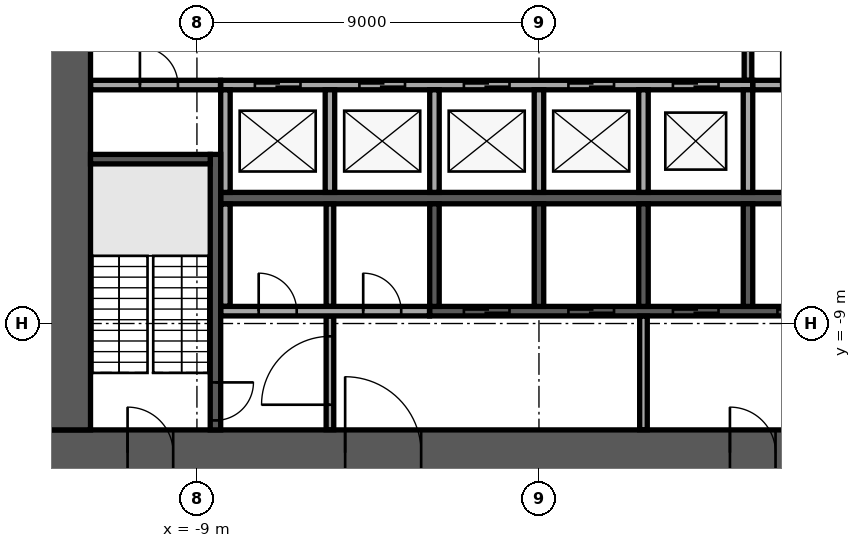
"""IFC4 building model, lengths in metres.
Left out: names, types, materials, properties, quantities, classifications, styles, units other than length and angle.
Written with IfcOpenShell. Run it as: python <this file> out.ifc"""

import sys

from ifc_helpers import new_model, si_unit, direction, frame, frame_2d, origin, place, context, subcontext, project, spatial, rectangle, extrude, element, fill, save


model = new_model("IFC4")
c1 = context("Model", 3, precision=1e-05, world=origin(), true_north=direction((0.0, 1.0)))
c2 = subcontext(c1, "Body", "Model", "MODEL_VIEW")
j1 = project(units=[si_unit("LENGTHUNIT", "METRE"), si_unit("PLANEANGLEUNIT", "RADIAN")], contexts=[c1])
p1 = place(None, origin())
s1 = spatial("IfcSite", under=j1, at=p1, CompositionType="ELEMENT")
p2 = place(p1, origin())
s2 = spatial("IfcBuilding", under=s1, at=p2, CompositionType="ELEMENT")
p3 = place(p2, origin())
s3 = spatial("IfcBuildingStorey", under=s2, at=p3, CompositionType="ELEMENT", Elevation=0.0)
p4 = place(p3, frame((-13.0, -12.4, 0.0), z_axis=(0.0, 0.0, 1.0), x_axis=(1.0, 0.0, 0.0)))
e1 = element("IfcWall", 1, at=p4, inside=s3, PredefinedType="SHEAR", context=c2, shape_type="SweptSolid", body=[
    extrude(rectangle(XDim=26.0, YDim=1.2, at=frame_2d((13.0, 0.0))), origin(), (0.0, 0.0, 1.0), 4.1),
])
p5 = place(p4, frame((7.9, 0.0, 0.0)))
e2 = element("IfcOpeningElement", 2, at=p5, cuts=e1, PredefinedType="OPENING", context=c2, shape_type="SweptSolid", body=[
    extrude(rectangle(XDim=2.0, YDim=2.1, at=frame_2d((1.0, 1.05))), frame((0.0, 0.61, 0.0), z_axis=(0.0, -1.0, 0.0), x_axis=(1.0, 0.0, 0.0)), (0.0, 0.0, 1.0), 1.22),
])
p6 = place(p4, frame((18.025, 0.0, 0.0)))
e3 = element("IfcOpeningElement", 3, at=p6, cuts=e1, PredefinedType="OPENING", context=c2, shape_type="SweptSolid", body=[
    extrude(rectangle(XDim=1.2, YDim=2.1, at=frame_2d((0.6, 1.05))), frame((0.0, 0.61, 0.0), z_axis=(0.0, -1.0, 0.0), x_axis=(1.0, 0.0, 0.0)), (0.0, 0.0, 1.0), 1.22),
])
p7 = place(p4, frame((2.175, 0.0, 0.0)))
e4 = element("IfcOpeningElement", 4, at=p7, cuts=e1, PredefinedType="OPENING", context=c2, shape_type="SweptSolid", body=[
    extrude(rectangle(XDim=1.2, YDim=2.1, at=frame_2d((0.6, 1.05))), frame((0.0, 0.61, 0.0), z_axis=(0.0, -1.0, 0.0), x_axis=(1.0, 0.0, 0.0)), (0.0, 0.0, 1.0), 1.22),
])
p8 = place(p4, frame((22.625, 0.0, 0.0)))
e5 = element("IfcOpeningElement", 5, at=p8, cuts=e1, PredefinedType="OPENING", context=c2, shape_type="SweptSolid", body=[
    extrude(rectangle(XDim=1.2, YDim=2.1, at=frame_2d((0.6, 1.05))), frame((0.0, 0.61, 0.0), z_axis=(0.0, -1.0, 0.0), x_axis=(1.0, 0.0, 0.0)), (0.0, 0.0, 1.0), 1.22),
])
p9 = place(p3, frame((-12.4, -11.8, 0.0), z_axis=(0.0, 0.0, 1.0), x_axis=(0.0, 1.0, 0.0)))
e6 = element("IfcWall", 6, at=p9, inside=s3, PredefinedType="SHEAR", context=c2, shape_type="SweptSolid", body=[
    extrude(rectangle(XDim=23.6, YDim=1.2, at=frame_2d((11.8, 0.0))), origin(), (0.0, 0.0, 1.0), 4.1),
])
p10 = place(p9, frame((10.6, 0.0, 0.0)))
e7 = element("IfcOpeningElement", 7, at=p10, cuts=e6, PredefinedType="OPENING", context=c2, shape_type="SweptSolid", body=[
    extrude(rectangle(XDim=2.4, YDim=2.4, at=frame_2d((1.2, 1.2))), frame((0.0, 0.61, 0.0), z_axis=(0.0, -1.0, 0.0), x_axis=(1.0, 0.0, 0.0)), (0.0, 0.0, 1.0), 1.22),
])
p11 = place(p3, frame((-8.375, -5.7, 0.0), z_axis=(0.0, 0.0, 1.0), x_axis=(1.0, 0.0, 0.0)))
e8 = element("IfcWall", 8, at=p11, inside=s3, PredefinedType="SOLIDWALL", context=c2, shape_type="SweptSolid", body=[
    extrude(rectangle(XDim=16.75, YDim=0.3, at=frame_2d((8.375, 0.0))), origin(), (0.0, 0.0, 1.0), 4.1),
])
p12 = place(p3, frame((-8.375, -2.725, 0.0), z_axis=(0.0, 0.0, 1.0), x_axis=(1.0, 0.0, 0.0)))
e9 = element("IfcWall", 9, at=p12, inside=s3, PredefinedType="SOLIDWALL", context=c2, shape_type="SweptSolid", body=[
    extrude(rectangle(XDim=14.0, YDim=0.25, at=frame_2d((7.0, 0.0))), origin(), (0.0, 0.0, 1.0), 4.1),
])
p13 = place(p12, frame((0.9, 0.0, 0.0)))
e10 = element("IfcOpeningElement", 10, at=p13, cuts=e9, PredefinedType="OPENING", context=c2, shape_type="SweptSolid", body=[
    extrude(rectangle(XDim=1.2, YDim=2.1, at=frame_2d((0.6, 1.05))), frame((0.0, 0.135, 0.0), z_axis=(0.0, -1.0, 0.0), x_axis=(1.0, 0.0, 0.0)), (0.0, 0.0, 1.0), 0.27),
])
p14 = place(p12, frame((3.65, 0.0, 0.0)))
e11 = element("IfcOpeningElement", 11, at=p14, cuts=e9, PredefinedType="OPENING", context=c2, shape_type="SweptSolid", body=[
    extrude(rectangle(XDim=1.2, YDim=2.1, at=frame_2d((0.6, 1.05))), frame((0.0, 0.135, 0.0), z_axis=(0.0, -1.0, 0.0), x_axis=(1.0, 0.0, 0.0)), (0.0, 0.0, 1.0), 0.27),
])
p15 = place(p12, frame((6.4, 0.0, 0.0)))
e12 = element("IfcOpeningElement", 12, at=p15, cuts=e9, PredefinedType="OPENING", context=c2, shape_type="SweptSolid", body=[
    extrude(rectangle(XDim=1.2, YDim=2.1, at=frame_2d((0.6, 1.05))), frame((0.0, 0.135, 0.0), z_axis=(0.0, -1.0, 0.0), x_axis=(1.0, 0.0, 0.0)), (0.0, 0.0, 1.0), 0.27),
])
p16 = place(p12, frame((9.15, 0.0, 0.0)))
e13 = element("IfcOpeningElement", 13, at=p16, cuts=e9, PredefinedType="OPENING", context=c2, shape_type="SweptSolid", body=[
    extrude(rectangle(XDim=1.2, YDim=2.1, at=frame_2d((0.6, 1.05))), frame((0.0, 0.135, 0.0), z_axis=(0.0, -1.0, 0.0), x_axis=(1.0, 0.0, 0.0)), (0.0, 0.0, 1.0), 0.27),
])
p17 = place(p12, frame((11.9, 0.0, 0.0)))
e14 = element("IfcOpeningElement", 14, at=p17, cuts=e9, PredefinedType="OPENING", context=c2, shape_type="SweptSolid", body=[
    extrude(rectangle(XDim=1.2, YDim=2.1, at=frame_2d((0.6, 1.05))), frame((0.0, 0.135, 0.0), z_axis=(0.0, -1.0, 0.0), x_axis=(1.0, 0.0, 0.0)), (0.0, 0.0, 1.0), 0.27),
])
for number, where, z_axis, x_axis in (
    (15, (-8.25, -5.55, 0.0), (0.0, 0.0, 1.0), (0.0, 1.0, 0.0)),
    (16, (-5.5, -5.55, 0.0), (0.0, 0.0, 1.0), (0.0, 1.0, 0.0)),
    (17, (-2.75, -5.55, 0.0), (0.0, 0.0, 1.0), (0.0, 1.0, 0.0)),
    (18, (0.0, -5.55, 0.0), (0.0, 0.0, 1.0), (0.0, 1.0, 0.0)),
    (19, (2.75, -5.55, 0.0), (0.0, 0.0, 1.0), (0.0, 1.0, 0.0)),
    (20, (5.5, -5.55, 0.0), (0.0, 0.0, 1.0), (0.0, 1.0, 0.0)),
):
    element("IfcWall", number, at=place(p3, frame(where, z_axis=z_axis, x_axis=x_axis)), inside=s3, PredefinedType="SOLIDWALL", context=c2, shape_type="SweptSolid", body=[
        extrude(rectangle(XDim=2.7, YDim=0.25, at=frame_2d((1.35, 0.0))), origin(), (0.0, 0.0, 1.0), 4.1),
    ])
p18 = place(p3, frame((-2.875, -8.675, 0.0), z_axis=(0.0, 0.0, 1.0), x_axis=(1.0, 0.0, 0.0)))
e21 = element("IfcWall", 21, at=p18, inside=s3, PredefinedType="SOLIDWALL", context=c2, shape_type="SweptSolid", body=[
    extrude(rectangle(XDim=11.25, YDim=0.25, at=frame_2d((5.625, 0.0))), origin(), (0.0, 0.0, 1.0), 4.1),
])
p19 = place(p18, frame((0.9, 0.0, 0.0)))
e22 = element("IfcOpeningElement", 22, at=p19, cuts=e21, PredefinedType="OPENING", context=c2, shape_type="SweptSolid", body=[
    extrude(rectangle(XDim=1.2, YDim=2.1, at=frame_2d((0.6, 1.05))), frame((0.0, 0.135, 0.0), z_axis=(0.0, -1.0, 0.0), x_axis=(1.0, 0.0, 0.0)), (0.0, 0.0, 1.0), 0.27),
])
p20 = place(p18, frame((3.65, 0.0, 0.0)))
e23 = element("IfcOpeningElement", 23, at=p20, cuts=e21, PredefinedType="OPENING", context=c2, shape_type="SweptSolid", body=[
    extrude(rectangle(XDim=1.2, YDim=2.1, at=frame_2d((0.6, 1.05))), frame((0.0, 0.135, 0.0), z_axis=(0.0, -1.0, 0.0), x_axis=(1.0, 0.0, 0.0)), (0.0, 0.0, 1.0), 0.27),
])
p21 = place(p18, frame((6.4, 0.0, 0.0)))
e24 = element("IfcOpeningElement", 24, at=p21, cuts=e21, PredefinedType="OPENING", context=c2, shape_type="SweptSolid", body=[
    extrude(rectangle(XDim=1.2, YDim=2.1, at=frame_2d((0.6, 1.05))), frame((0.0, 0.135, 0.0), z_axis=(0.0, -1.0, 0.0), x_axis=(1.0, 0.0, 0.0)), (0.0, 0.0, 1.0), 0.27),
])
p22 = place(p18, frame((9.15, 0.0, 0.0)))
e25 = element("IfcOpeningElement", 25, at=p22, cuts=e21, PredefinedType="OPENING", context=c2, shape_type="SweptSolid", body=[
    extrude(rectangle(XDim=1.2, YDim=2.1, at=frame_2d((0.6, 1.05))), frame((0.0, 0.135, 0.0), z_axis=(0.0, -1.0, 0.0), x_axis=(1.0, 0.0, 0.0)), (0.0, 0.0, 1.0), 0.27),
])
for number, where, z_axis, x_axis in (
    (26, (-2.75, -8.55, 0.0), (0.0, 0.0, 1.0), (0.0, 1.0, 0.0)),
    (27, (0.0, -8.55, 0.0), (0.0, 0.0, 1.0), (0.0, 1.0, 0.0)),
    (28, (2.75, -8.55, 0.0), (0.0, 0.0, 1.0), (0.0, 1.0, 0.0)),
    (29, (5.5, -8.55, 0.0), (0.0, 0.0, 1.0), (0.0, 1.0, 0.0)),
):
    element("IfcWall", number, at=place(p3, frame(where, z_axis=z_axis, x_axis=x_axis)), inside=s3, PredefinedType="SOLIDWALL", context=c2, shape_type="SweptSolid", body=[
        extrude(rectangle(XDim=2.7, YDim=0.25, at=frame_2d((1.35, 0.0))), origin(), (0.0, 0.0, 1.0), 4.1),
    ])
p23 = place(p3, frame((-8.512, -4.55, 0.0), z_axis=(0.0, 0.0, 1.0), x_axis=(0.0, -1.0, 0.0)))
e30 = element("IfcWall", 30, at=p23, inside=s3, PredefinedType="SOLIDWALL", context=c2, shape_type="SweptSolid", body=[
    extrude(rectangle(XDim=7.25, YDim=0.275, at=frame_2d((3.625, 0.0))), origin(), (0.0, 0.0, 1.0), 4.1),
])
p24 = place(p23, frame((6.0, 0.0, 0.0)))
e31 = element("IfcOpeningElement", 31, at=p24, cuts=e30, PredefinedType="OPENING", context=c2, shape_type="SweptSolid", body=[
    extrude(rectangle(XDim=1.0, YDim=2.1, at=frame_2d((0.5, 1.05))), frame((0.0, 0.147, 0.0), z_axis=(0.0, -1.0, 0.0), x_axis=(1.0, 0.0, 0.0)), (0.0, 0.0, 1.0), 0.295),
])
p25 = place(p3, frame((-8.65, -4.675, 0.0), z_axis=(0.0, 0.0, 1.0), x_axis=(-1.0, 0.0, 0.0)))
e32 = element("IfcWall", 32, at=p25, inside=s3, PredefinedType="SOLIDWALL", context=c2, shape_type="SweptSolid", body=[
    extrude(rectangle(XDim=3.15, YDim=0.25, at=frame_2d((1.575, 0.0))), origin(), (0.0, 0.0, 1.0), 4.1),
])
p26 = place(p3, frame((-5.5, -11.795, 0.0), z_axis=(0.0, 0.0, 1.0), x_axis=(0.0, 1.0, 0.0)))
e33 = element("IfcWall", 33, at=p26, inside=s3, PredefinedType="PARTITIONING", context=c2, shape_type="SweptSolid", body=[
    extrude(rectangle(XDim=2.99, YDim=0.2, at=frame_2d((1.495, 0.0))), origin(), (0.0, 0.0, 1.0), 4.1),
])
p27 = place(p26, frame((0.657, 0.0, 0.0)))
e34 = element("IfcOpeningElement", 34, at=p27, cuts=e33, PredefinedType="OPENING", context=c2, shape_type="SweptSolid", body=[
    extrude(rectangle(XDim=1.8, YDim=2.1, at=frame_2d((0.9, 1.05))), frame((0.0, 0.11, 0.0), z_axis=(0.0, -1.0, 0.0), x_axis=(1.0, 0.0, 0.0)), (0.0, 0.0, 1.0), 0.22),
])
p28 = place(p3, frame((2.75, -11.795, 0.0), z_axis=(0.0, 0.0, 1.0), x_axis=(0.0, 1.0, 0.0)))
e35 = element("IfcWall", 35, at=p28, inside=s3, PredefinedType="PARTITIONING", context=c2, shape_type="SweptSolid", body=[
    extrude(rectangle(XDim=2.99, YDim=0.2, at=frame_2d((1.495, 0.0))), origin(), (0.0, 0.0, 1.0), 4.1),
])
p29 = place(p3, frame((-8.37, -8.675, 0.0), z_axis=(0.0, 0.0, 1.0), x_axis=(1.0, 0.0, 0.0)))
e36 = element("IfcWall", 36, at=p29, inside=s3, PredefinedType="PARTITIONING", context=c2, shape_type="SweptSolid", body=[
    extrude(rectangle(XDim=5.49, YDim=0.25, at=frame_2d((2.745, 0.0))), origin(), (0.0, 0.0, 1.0), 4.1),
])
p30 = place(p29, frame((0.995, 0.0, 0.0)))
e37 = element("IfcOpeningElement", 37, at=p30, cuts=e36, PredefinedType="OPENING", context=c2, shape_type="SweptSolid", body=[
    extrude(rectangle(XDim=1.0, YDim=2.1, at=frame_2d((0.5, 1.05))), frame((0.0, 0.135, 0.0), z_axis=(0.0, -1.0, 0.0), x_axis=(1.0, 0.0, 0.0)), (0.0, 0.0, 1.0), 0.27),
])
p31 = place(p29, frame((3.745, 0.0, 0.0)))
e38 = element("IfcOpeningElement", 38, at=p31, cuts=e36, PredefinedType="OPENING", context=c2, shape_type="SweptSolid", body=[
    extrude(rectangle(XDim=1.0, YDim=2.1, at=frame_2d((0.5, 1.05))), frame((0.0, 0.135, 0.0), z_axis=(0.0, -1.0, 0.0), x_axis=(1.0, 0.0, 0.0)), (0.0, 0.0, 1.0), 0.27),
])
p32 = place(p3, frame((-8.25, -8.545, 0.0), z_axis=(0.0, 0.0, 1.0), x_axis=(0.0, 1.0, 0.0)))
e39 = element("IfcWall", 39, at=p32, inside=s3, PredefinedType="PARTITIONING", context=c2, shape_type="SweptSolid", body=[
    extrude(rectangle(XDim=2.69, YDim=0.25, at=frame_2d((1.345, 0.0))), origin(), (0.0, 0.0, 1.0), 4.1),
])
p33 = place(p3, frame((-5.5, -8.545, 0.0), z_axis=(0.0, 0.0, 1.0), x_axis=(0.0, 1.0, 0.0)))
e40 = element("IfcWall", 40, at=p33, inside=s3, PredefinedType="PARTITIONING", context=c2, shape_type="SweptSolid", body=[
    extrude(rectangle(XDim=2.69, YDim=0.2, at=frame_2d((1.345, 0.0))), origin(), (0.0, 0.0, 1.0), 4.1),
])
p34 = place(p3, frame((-11.795, -2.725, 0.0), z_axis=(0.0, 0.0, 1.0), x_axis=(1.0, 0.0, 0.0)))
e41 = element("IfcWall", 41, at=p34, inside=s3, PredefinedType="PARTITIONING", context=c2, shape_type="SweptSolid", body=[
    extrude(rectangle(XDim=3.415, YDim=0.25, at=frame_2d((1.708, 0.0))), origin(), (0.0, 0.0, 1.0), 4.1),
])
p35 = place(p34, frame((1.295, 0.0, 0.0)))
e42 = element("IfcOpeningElement", 42, at=p35, cuts=e41, PredefinedType="OPENING", context=c2, shape_type="SweptSolid", body=[
    extrude(rectangle(XDim=1.0, YDim=2.1, at=frame_2d((0.5, 1.05))), frame((0.0, 0.135, 0.0), z_axis=(0.0, -1.0, 0.0), x_axis=(1.0, 0.0, 0.0)), (0.0, 0.0, 1.0), 0.27),
])
p36 = place(p3, frame((5.63, -2.725, 0.0), z_axis=(0.0, 0.0, 1.0), x_axis=(1.0, 0.0, 0.0)))
e43 = element("IfcWall", 43, at=p36, inside=s3, PredefinedType="PARTITIONING", context=c2, shape_type="SweptSolid", body=[
    extrude(rectangle(XDim=6.165, YDim=0.25, at=frame_2d((3.083, 0.0))), origin(), (0.0, 0.0, 1.0), 4.1),
])
p37 = place(p36, frame((0.745, 0.0, 0.0)))
e44 = element("IfcOpeningElement", 44, at=p37, cuts=e43, PredefinedType="OPENING", context=c2, shape_type="SweptSolid", body=[
    extrude(rectangle(XDim=1.0, YDim=2.1, at=frame_2d((0.5, 1.05))), frame((0.0, 0.135, 0.0), z_axis=(0.0, -1.0, 0.0), x_axis=(1.0, 0.0, 0.0)), (0.0, 0.0, 1.0), 0.27),
])
p38 = place(p36, frame((3.92, 0.0, 0.0)))
e45 = element("IfcOpeningElement", 45, at=p38, cuts=e43, PredefinedType="OPENING", context=c2, shape_type="SweptSolid", body=[
    extrude(rectangle(XDim=0.9, YDim=2.1, at=frame_2d((0.45, 1.05))), frame((0.0, 0.135, 0.0), z_axis=(0.0, -1.0, 0.0), x_axis=(1.0, 0.0, 0.0)), (0.0, 0.0, 1.0), 0.27),
])
p39 = place(p3, frame((5.5, -2.595, 0.0), z_axis=(0.0, 0.0, 1.0), x_axis=(0.0, 1.0, 0.0)))
e46 = element("IfcWall", 46, at=p39, inside=s3, PredefinedType="PARTITIONING", context=c2, shape_type="SweptSolid", body=[
    extrude(rectangle(XDim=5.19, YDim=0.2, at=frame_2d((2.595, 0.0))), origin(), (0.0, 0.0, 1.0), 4.1),
])
p40 = place(p39, frame((1.395, 0.0, 0.0)))
e47 = element("IfcOpeningElement", 47, at=p40, cuts=e46, PredefinedType="OPENING", context=c2, shape_type="SweptSolid", body=[
    extrude(rectangle(XDim=2.4, YDim=2.4, at=frame_2d((1.2, 1.2))), frame((0.0, 0.11, 0.0), z_axis=(0.0, -1.0, 0.0), x_axis=(1.0, 0.0, 0.0)), (0.0, 0.0, 1.0), 0.22),
])
p41 = place(p5, origin())
e48 = element("IfcDoor", 48, at=p41, inside=s3, OperationType="SINGLE_SWING_LEFT", PredefinedType="DOOR", context=c2, shape_type="SweptSolid", body=[
    extrude(rectangle(XDim=2.0, YDim=2.1, at=frame_2d((1.0, 1.05))), frame((0.0, 0.025, 0.0), z_axis=(0.0, -1.0, 0.0), x_axis=(1.0, 0.0, 0.0)), (0.0, 0.0, 1.0), 0.05),
])
fill(e2, e48)
p42 = place(p6, origin())
e49 = element("IfcDoor", 49, at=p42, inside=s3, OperationType="SINGLE_SWING_LEFT", PredefinedType="DOOR", context=c2, shape_type="SweptSolid", body=[
    extrude(rectangle(XDim=1.2, YDim=2.1, at=frame_2d((0.6, 1.05))), frame((0.0, 0.025, 0.0), z_axis=(0.0, -1.0, 0.0), x_axis=(1.0, 0.0, 0.0)), (0.0, 0.0, 1.0), 0.05),
])
fill(e3, e49)
p43 = place(p7, origin())
e50 = element("IfcDoor", 50, at=p43, inside=s3, OperationType="SINGLE_SWING_LEFT", PredefinedType="DOOR", context=c2, shape_type="SweptSolid", body=[
    extrude(rectangle(XDim=1.2, YDim=2.1, at=frame_2d((0.6, 1.05))), frame((0.0, 0.025, 0.0), z_axis=(0.0, -1.0, 0.0), x_axis=(1.0, 0.0, 0.0)), (0.0, 0.0, 1.0), 0.05),
])
fill(e4, e50)
p44 = place(p13, origin())
e51 = element("IfcDoor", 51, at=p44, inside=s3, OperationType="DOUBLE_DOOR_SLIDING", PredefinedType="DOOR", context=c2, shape_type="SweptSolid", body=[
    extrude(rectangle(XDim=1.2, YDim=2.1, at=frame_2d((0.6, 1.05))), frame((0.0, 0.025, 0.0), z_axis=(0.0, -1.0, 0.0), x_axis=(1.0, 0.0, 0.0)), (0.0, 0.0, 1.0), 0.05),
])
fill(e10, e51)
p45 = place(p14, origin())
e52 = element("IfcDoor", 52, at=p45, inside=s3, OperationType="DOUBLE_DOOR_SLIDING", PredefinedType="DOOR", context=c2, shape_type="SweptSolid", body=[
    extrude(rectangle(XDim=1.2, YDim=2.1, at=frame_2d((0.6, 1.05))), frame((0.0, 0.025, 0.0), z_axis=(0.0, -1.0, 0.0), x_axis=(1.0, 0.0, 0.0)), (0.0, 0.0, 1.0), 0.05),
])
fill(e11, e52)
p46 = place(p15, origin())
e53 = element("IfcDoor", 53, at=p46, inside=s3, OperationType="DOUBLE_DOOR_SLIDING", PredefinedType="DOOR", context=c2, shape_type="SweptSolid", body=[
    extrude(rectangle(XDim=1.2, YDim=2.1, at=frame_2d((0.6, 1.05))), frame((0.0, 0.025, 0.0), z_axis=(0.0, -1.0, 0.0), x_axis=(1.0, 0.0, 0.0)), (0.0, 0.0, 1.0), 0.05),
])
fill(e12, e53)
p47 = place(p16, origin())
e54 = element("IfcDoor", 54, at=p47, inside=s3, OperationType="DOUBLE_DOOR_SLIDING", PredefinedType="DOOR", context=c2, shape_type="SweptSolid", body=[
    extrude(rectangle(XDim=1.2, YDim=2.1, at=frame_2d((0.6, 1.05))), frame((0.0, 0.025, 0.0), z_axis=(0.0, -1.0, 0.0), x_axis=(1.0, 0.0, 0.0)), (0.0, 0.0, 1.0), 0.05),
])
fill(e13, e54)
p48 = place(p17, origin())
e55 = element("IfcDoor", 55, at=p48, inside=s3, OperationType="DOUBLE_DOOR_SLIDING", PredefinedType="DOOR", context=c2, shape_type="SweptSolid", body=[
    extrude(rectangle(XDim=1.2, YDim=2.1, at=frame_2d((0.6, 1.05))), frame((0.0, 0.025, 0.0), z_axis=(0.0, -1.0, 0.0), x_axis=(1.0, 0.0, 0.0)), (0.0, 0.0, 1.0), 0.05),
])
fill(e14, e55)
p49 = place(p19, origin())
e56 = element("IfcDoor", 56, at=p49, inside=s3, OperationType="DOUBLE_DOOR_SLIDING", PredefinedType="DOOR", context=c2, shape_type="SweptSolid", body=[
    extrude(rectangle(XDim=1.2, YDim=2.1, at=frame_2d((0.6, 1.05))), frame((0.0, 0.025, 0.0), z_axis=(0.0, -1.0, 0.0), x_axis=(1.0, 0.0, 0.0)), (0.0, 0.0, 1.0), 0.05),
])
fill(e22, e56)
p50 = place(p20, origin())
e57 = element("IfcDoor", 57, at=p50, inside=s3, OperationType="DOUBLE_DOOR_SLIDING", PredefinedType="DOOR", context=c2, shape_type="SweptSolid", body=[
    extrude(rectangle(XDim=1.2, YDim=2.1, at=frame_2d((0.6, 1.05))), frame((0.0, 0.025, 0.0), z_axis=(0.0, -1.0, 0.0), x_axis=(1.0, 0.0, 0.0)), (0.0, 0.0, 1.0), 0.05),
])
fill(e23, e57)
p51 = place(p21, origin())
e58 = element("IfcDoor", 58, at=p51, inside=s3, OperationType="DOUBLE_DOOR_SLIDING", PredefinedType="DOOR", context=c2, shape_type="SweptSolid", body=[
    extrude(rectangle(XDim=1.2, YDim=2.1, at=frame_2d((0.6, 1.05))), frame((0.0, 0.025, 0.0), z_axis=(0.0, -1.0, 0.0), x_axis=(1.0, 0.0, 0.0)), (0.0, 0.0, 1.0), 0.05),
])
fill(e24, e58)
p52 = place(p22, origin())
e59 = element("IfcDoor", 59, at=p52, inside=s3, OperationType="DOUBLE_DOOR_SLIDING", PredefinedType="DOOR", context=c2, shape_type="SweptSolid", body=[
    extrude(rectangle(XDim=1.2, YDim=2.1, at=frame_2d((0.6, 1.05))), frame((0.0, 0.025, 0.0), z_axis=(0.0, -1.0, 0.0), x_axis=(1.0, 0.0, 0.0)), (0.0, 0.0, 1.0), 0.05),
])
fill(e25, e59)
p53 = place(p24, origin())
e60 = element("IfcDoor", 60, at=p53, inside=s3, OperationType="SINGLE_SWING_LEFT", PredefinedType="DOOR", context=c2, shape_type="SweptSolid", body=[
    extrude(rectangle(XDim=1.0, YDim=2.1, at=frame_2d((0.5, 1.05))), frame((0.0, 0.025, 0.0), z_axis=(0.0, -1.0, 0.0), x_axis=(1.0, 0.0, 0.0)), (0.0, 0.0, 1.0), 0.05),
])
fill(e31, e60)
p54 = place(p30, origin())
e61 = element("IfcDoor", 61, at=p54, inside=s3, OperationType="SINGLE_SWING_LEFT", PredefinedType="DOOR", context=c2, shape_type="SweptSolid", body=[
    extrude(rectangle(XDim=1.0, YDim=2.1, at=frame_2d((0.5, 1.05))), frame((0.0, 0.025, 0.0), z_axis=(0.0, -1.0, 0.0), x_axis=(1.0, 0.0, 0.0)), (0.0, 0.0, 1.0), 0.05),
])
fill(e37, e61)
p55 = place(p31, origin())
e62 = element("IfcDoor", 62, at=p55, inside=s3, OperationType="SINGLE_SWING_LEFT", PredefinedType="DOOR", context=c2, shape_type="SweptSolid", body=[
    extrude(rectangle(XDim=1.0, YDim=2.1, at=frame_2d((0.5, 1.05))), frame((0.0, 0.025, 0.0), z_axis=(0.0, -1.0, 0.0), x_axis=(1.0, 0.0, 0.0)), (0.0, 0.0, 1.0), 0.05),
])
fill(e38, e62)
p56 = place(p35, origin())
e63 = element("IfcDoor", 63, at=p56, inside=s3, OperationType="SINGLE_SWING_LEFT", PredefinedType="DOOR", context=c2, shape_type="SweptSolid", body=[
    extrude(rectangle(XDim=1.0, YDim=2.1, at=frame_2d((0.5, 1.05))), frame((0.0, 0.025, 0.0), z_axis=(0.0, -1.0, 0.0), x_axis=(1.0, 0.0, 0.0)), (0.0, 0.0, 1.0), 0.05),
])
fill(e42, e63)
p57 = place(p27, origin())
e64 = element("IfcDoor", 64, at=p57, inside=s3, OperationType="SINGLE_SWING_LEFT", PredefinedType="DOOR", context=c2, shape_type="SweptSolid", body=[
    extrude(rectangle(XDim=1.8, YDim=2.1, at=frame_2d((0.9, 1.05))), frame((0.0, 0.025, 0.0), z_axis=(0.0, -1.0, 0.0), x_axis=(1.0, 0.0, 0.0)), (0.0, 0.0, 1.0), 0.05),
])
fill(e34, e64)
save(model, sys.argv[1])
